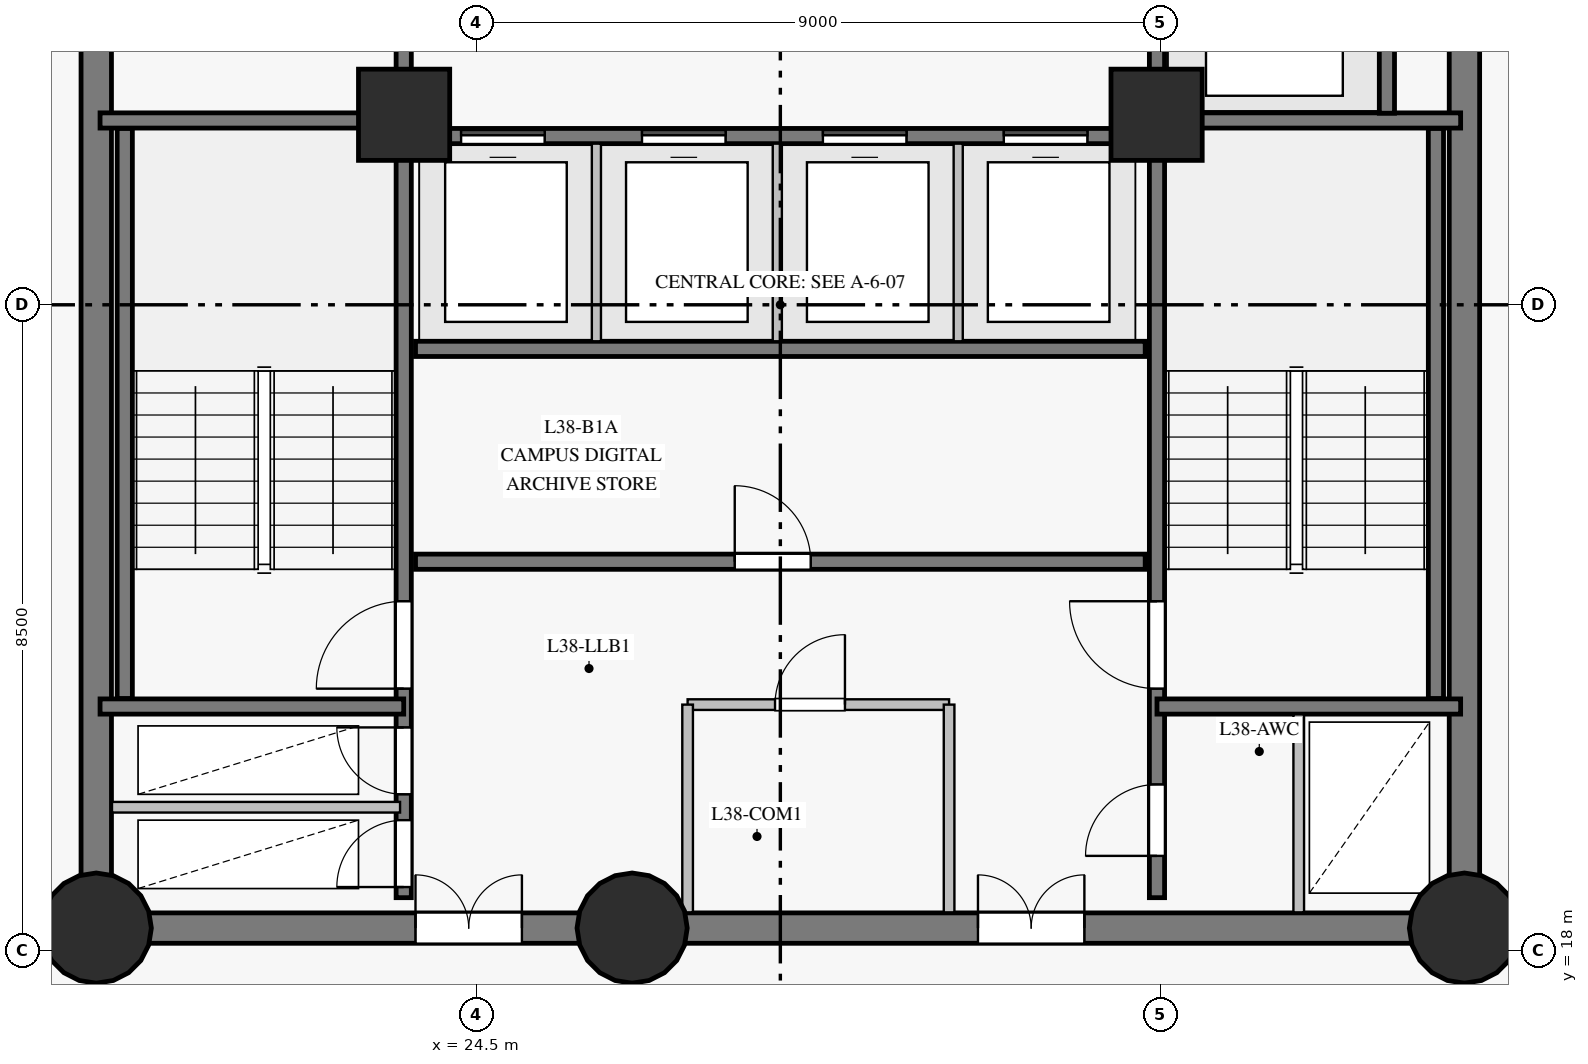
"""IFC4 building model, lengths in metres.
Left out: names, types, materials, properties, quantities, classifications, styles, units other than length and angle.
Written with IfcOpenShell. Run it as: python <this file> out.ifc"""

import sys

from ifc_helpers import new_model, si_unit, direction, frame, frame_2d, origin, origin_with_axes, origin_2d, place, context, subcontext, project, spatial, rectangle, circle, extrude, source, transform, mapped, element, fill, save


model = new_model("IFC4")
c1 = context("Model", 3, precision=1e-05, world=origin(), true_north=direction((0.0, 1.0)))
c2 = subcontext(c1, "Body", "Model", "MODEL_VIEW")
j1 = project(units=[si_unit("LENGTHUNIT", "METRE"), si_unit("PLANEANGLEUNIT", "RADIAN")], contexts=[c1])
p1 = place(None, origin())
s1 = spatial("IfcSite", under=j1, at=p1, CompositionType="ELEMENT")
p2 = place(p1, origin())
s2 = spatial("IfcBuilding", under=s1, at=p2, CompositionType="ELEMENT")
p3 = place(p2, frame((0.0, 0.0, 135.85)))
s3 = spatial("IfcBuildingStorey", under=s2, at=p3, CompositionType="ELEMENT", Elevation=135.85)
p4 = place(p3, frame((19.5, 18.3, 0.0), z_axis=(0.0, 0.0, 1.0), x_axis=(1.0, 0.0, 0.0)))
e1 = element("IfcWall", 1, at=p4, inside=s3, PredefinedType="SHEAR", context=c2, shape_type="SweptSolid", body=[
    extrude(rectangle(XDim=7.05, YDim=0.4, at=frame_2d((3.525, 0.0))), origin(), (0.0, 0.0, 1.0), 2.825),
])
p5 = place(p4, frame((4.2, 0.0, 0.0)))
e2 = element("IfcOpeningElement", 2, at=p5, cuts=e1, PredefinedType="OPENING", context=c2, shape_type="SweptSolid", body=[
    extrude(rectangle(XDim=1.4, YDim=2.2, at=frame_2d((0.7, 1.1))), frame((0.0, 0.21, 0.0), z_axis=(0.0, -1.0, 0.0), x_axis=(1.0, 0.0, 0.0)), (0.0, 0.0, 1.0), 0.42),
])
p6 = place(p3, frame((26.55, 18.3, 0.0), z_axis=(0.0, 0.0, 1.0), x_axis=(1.0, 0.0, 0.0)))
e3 = element("IfcWall", 3, at=p6, inside=s3, PredefinedType="SHEAR", context=c2, shape_type="SweptSolid", body=[
    extrude(rectangle(XDim=10.95, YDim=0.4, at=frame_2d((5.475, 0.0))), origin(), (0.0, 0.0, 1.0), 2.825),
])
p7 = place(p6, frame((4.55, 0.0, 0.0)))
e4 = element("IfcOpeningElement", 4, at=p7, cuts=e3, PredefinedType="OPENING", context=c2, shape_type="SweptSolid", body=[
    extrude(rectangle(XDim=1.4, YDim=2.2, at=frame_2d((0.7, 1.1))), frame((0.0, 0.21, 0.0), z_axis=(0.0, -1.0, 0.0), x_axis=(1.0, 0.0, 0.0)), (0.0, 0.0, 1.0), 0.42),
])
p8 = place(p3, frame((37.5, 18.3, 0.0), z_axis=(0.0, 0.0, 1.0), x_axis=(0.0, 1.0, 0.0)))
e5 = element("IfcWall", 5, at=p8, inside=s3, PredefinedType="SHEAR", context=c2, shape_type="SweptSolid", body=[
    extrude(rectangle(XDim=16.4, YDim=0.4, at=frame_2d((8.2, 0.0))), origin(), (0.0, 0.0, 1.0), 2.825),
])
p9 = place(p8, frame((14.15, 0.0, 0.0)))
e6 = element("IfcOpeningElement", 6, at=p9, cuts=e5, PredefinedType="OPENING", context=c2, shape_type="SweptSolid", body=[
    extrude(rectangle(XDim=1.2, YDim=2.15, at=frame_2d((0.6, 1.075))), frame((0.0, 0.21, 0.0), z_axis=(0.0, -1.0, 0.0), x_axis=(1.0, 0.0, 0.0)), (0.0, 0.0, 1.0), 0.42),
])
p10 = place(p3, frame((19.5, 34.7, 0.0), z_axis=(0.0, 0.0, 1.0), x_axis=(0.0, -1.0, 0.0)))
e7 = element("IfcWall", 7, at=p10, inside=s3, PredefinedType="SHEAR", context=c2, shape_type="SweptSolid", body=[
    extrude(rectangle(XDim=16.4, YDim=0.4, at=frame_2d((8.2, 0.0))), origin(), (0.0, 0.0, 1.0), 2.825),
])
p11 = place(p10, frame((3.1, 0.0, 0.0)))
e8 = element("IfcOpeningElement", 8, at=p11, cuts=e7, PredefinedType="OPENING", context=c2, shape_type="SweptSolid", body=[
    extrude(rectangle(XDim=1.1, YDim=2.15, at=frame_2d((0.55, 1.075))), frame((0.0, 0.21, 0.0), z_axis=(0.0, -1.0, 0.0), x_axis=(1.0, 0.0, 0.0)), (0.0, 0.0, 1.0), 0.42),
])
m1 = source(origin_with_axes(), c2, "Body", "SweptSolid", [
    extrude(circle(Radius=0.725, at=origin_2d()), origin(), (0.0, 0.0, 1.0), 3.05),
])
for number, where, z_axis, x_axis in (
    (9, (19.5, 18.3, 0.0), (0.0, 0.0, 1.0), (1.0, 0.0, 0.0)),
    (10, (26.55, 18.3, 0.0), (0.0, 0.0, 1.0), (1.0, 0.0, 0.0)),
    (11, (37.5, 18.3, 0.0), (0.0, 0.0, 1.0), (1.0, 0.0, 0.0)),
):
    element("IfcColumn", number, at=place(p3, frame(where, z_axis=z_axis, x_axis=x_axis)), inside=s3, PredefinedType="COLUMN", context=c2, shape_type="MappedRepresentation", body=[
        mapped(m1, transform((0.0, 0.0, 0.0), scale=1.0)),
    ])
m2 = source(origin_with_axes(), c2, "Body", "SweptSolid", [
    extrude(rectangle(XDim=1.2, YDim=1.2, at=origin_2d()), origin(), (0.0, 0.0, 1.0), 3.05),
])
for number, where, z_axis, x_axis in (
    (12, (23.55, 29.0, 0.0), (0.0, 0.0, 1.0), (1.0, 0.0, 0.0)),
    (13, (33.45, 29.0, 0.0), (0.0, 0.0, 1.0), (1.0, 0.0, 0.0)),
):
    element("IfcColumn", number, at=place(p3, frame(where, z_axis=z_axis, x_axis=x_axis)), inside=s3, PredefinedType="COLUMN", context=c2, shape_type="MappedRepresentation", body=[
        mapped(m2, transform((0.0, 0.0, 0.0), scale=1.0)),
    ])
p12 = place(p3, frame((23.545, 18.7, 0.0), z_axis=(0.0, 0.0, 1.0), x_axis=(0.0, 1.0, 0.0)))
e14 = element("IfcWall", 14, at=p12, inside=s3, PredefinedType="SHEAR", context=c2, shape_type="SweptSolid", body=[
    extrude(rectangle(XDim=15.6, YDim=0.2, at=frame_2d((7.8, 0.0))), origin(), (0.0, 0.0, 1.0), 2.825),
])
p13 = place(p12, frame((2.75, 0.0, 0.0)))
e15 = element("IfcOpeningElement", 15, at=p13, cuts=e14, PredefinedType="OPENING", context=c2, shape_type="SweptSolid", body=[
    extrude(rectangle(XDim=1.15, YDim=2.15, at=frame_2d((0.575, 1.075))), frame((0.0, 0.11, 0.0), z_axis=(0.0, -1.0, 0.0), x_axis=(1.0, 0.0, 0.0)), (0.0, 0.0, 1.0), 0.22),
])
p14 = place(p12, frame((0.14, 0.0, 0.0)))
e16 = element("IfcOpeningElement", 16, at=p14, cuts=e14, PredefinedType="OPENING", context=c2, shape_type="SweptSolid", body=[
    extrude(rectangle(XDim=0.88, YDim=2.1, at=frame_2d((0.44, 1.05))), frame((0.0, 0.11, 0.0), z_axis=(0.0, -1.0, 0.0), x_axis=(1.0, 0.0, 0.0)), (0.0, 0.0, 1.0), 0.22),
])
p15 = place(p12, frame((1.36, 0.0, 0.0)))
e17 = element("IfcOpeningElement", 17, at=p15, cuts=e14, PredefinedType="OPENING", context=c2, shape_type="SweptSolid", body=[
    extrude(rectangle(XDim=0.88, YDim=2.1, at=frame_2d((0.44, 1.05))), frame((0.0, 0.11, 0.0), z_axis=(0.0, -1.0, 0.0), x_axis=(1.0, 0.0, 0.0)), (0.0, 0.0, 1.0), 0.22),
])
p16 = place(p12, frame((12.1, 0.0, 0.0)))
e18 = element("IfcOpeningElement", 18, at=p16, cuts=e14, PredefinedType="OPENING", context=c2, shape_type="SweptSolid", body=[
    extrude(rectangle(XDim=1.12, YDim=2.15, at=frame_2d((0.56, 1.075))), frame((0.0, 0.11, 0.0), z_axis=(0.0, -1.0, 0.0), x_axis=(1.0, 0.0, 0.0)), (0.0, 0.0, 1.0), 0.22),
])
p17 = place(p12, frame((14.05, 0.0, 0.0)))
e19 = element("IfcOpeningElement", 19, at=p17, cuts=e14, PredefinedType="OPENING", context=c2, shape_type="SweptSolid", body=[
    extrude(rectangle(XDim=1.12, YDim=2.15, at=frame_2d((0.56, 1.075))), frame((0.0, 0.11, 0.0), z_axis=(0.0, -1.0, 0.0), x_axis=(1.0, 0.0, 0.0)), (0.0, 0.0, 1.0), 0.22),
])
p18 = place(p3, frame((33.455, 18.7, 0.0), z_axis=(0.0, 0.0, 1.0), x_axis=(0.0, 1.0, 0.0)))
e20 = element("IfcWall", 20, at=p18, inside=s3, PredefinedType="SHEAR", context=c2, shape_type="SweptSolid", body=[
    extrude(rectangle(XDim=15.6, YDim=0.2, at=frame_2d((7.8, 0.0))), origin(), (0.0, 0.0, 1.0), 2.825),
])
p19 = place(p18, frame((2.75, 0.0, 0.0)))
e21 = element("IfcOpeningElement", 21, at=p19, cuts=e20, PredefinedType="OPENING", context=c2, shape_type="SweptSolid", body=[
    extrude(rectangle(XDim=1.15, YDim=2.15, at=frame_2d((0.575, 1.075))), frame((0.0, 0.11, 0.0), z_axis=(0.0, -1.0, 0.0), x_axis=(1.0, 0.0, 0.0)), (0.0, 0.0, 1.0), 0.22),
])
p20 = place(p18, frame((0.55, 0.0, 0.0)))
e22 = element("IfcOpeningElement", 22, at=p20, cuts=e20, PredefinedType="OPENING", context=c2, shape_type="SweptSolid", body=[
    extrude(rectangle(XDim=0.94, YDim=2.1, at=frame_2d((0.47, 1.05))), frame((0.0, 0.11, 0.0), z_axis=(0.0, -1.0, 0.0), x_axis=(1.0, 0.0, 0.0)), (0.0, 0.0, 1.0), 0.22),
])
p21 = place(p3, frame((23.7, 23.12, 0.0), z_axis=(0.0, 0.0, 1.0), x_axis=(1.0, 0.0, 0.0)))
e23 = element("IfcWall", 23, at=p21, inside=s3, PredefinedType="SHEAR", context=c2, shape_type="SweptSolid", body=[
    extrude(rectangle(XDim=9.6, YDim=0.2, at=frame_2d((4.8, 0.0))), origin(), (0.0, 0.0, 1.0), 2.825),
])
p22 = place(p21, frame((4.2, 0.0, 0.0)))
e24 = element("IfcOpeningElement", 24, at=p22, cuts=e23, PredefinedType="OPENING", context=c2, shape_type="SweptSolid", body=[
    extrude(rectangle(XDim=1.0, YDim=2.15, at=frame_2d((0.5, 1.075))), frame((0.0, 0.11, 0.0), z_axis=(0.0, -1.0, 0.0), x_axis=(1.0, 0.0, 0.0)), (0.0, 0.0, 1.0), 0.22),
])
p23 = place(p3, frame((23.7, 25.92, 0.0), z_axis=(0.0, 0.0, 1.0), x_axis=(1.0, 0.0, 0.0)))
e25 = element("IfcWall", 25, at=p23, inside=s3, PredefinedType="SHEAR", context=c2, shape_type="SweptSolid", body=[
    extrude(rectangle(XDim=9.6, YDim=0.2, at=frame_2d((4.8, 0.0))), origin(), (0.0, 0.0, 1.0), 2.825),
])
p24 = place(p3, frame((23.7, 28.72, 0.0), z_axis=(0.0, 0.0, 1.0), x_axis=(1.0, 0.0, 0.0)))
e26 = element("IfcWall", 26, at=p24, inside=s3, PredefinedType="SHEAR", context=c2, shape_type="SweptSolid", body=[
    extrude(rectangle(XDim=9.6, YDim=0.2, at=frame_2d((4.8, 0.0))), origin(), (0.0, 0.0, 1.0), 2.825),
])
p25 = place(p24, frame((0.6, 0.0, 0.0)))
e27 = element("IfcOpeningElement", 27, at=p25, cuts=e26, PredefinedType="OPENING", context=c2, shape_type="SweptSolid", body=[
    extrude(rectangle(XDim=1.1, YDim=2.15, at=frame_2d((0.55, 1.075))), frame((0.0, 0.11, 0.0), z_axis=(0.0, -1.0, 0.0), x_axis=(1.0, 0.0, 0.0)), (0.0, 0.0, 1.0), 0.22),
])
p26 = place(p24, frame((2.98, 0.0, 0.0)))
e28 = element("IfcOpeningElement", 28, at=p26, cuts=e26, PredefinedType="OPENING", context=c2, shape_type="SweptSolid", body=[
    extrude(rectangle(XDim=1.1, YDim=2.15, at=frame_2d((0.55, 1.075))), frame((0.0, 0.11, 0.0), z_axis=(0.0, -1.0, 0.0), x_axis=(1.0, 0.0, 0.0)), (0.0, 0.0, 1.0), 0.22),
])
p27 = place(p24, frame((5.36, 0.0, 0.0)))
e29 = element("IfcOpeningElement", 29, at=p27, cuts=e26, PredefinedType="OPENING", context=c2, shape_type="SweptSolid", body=[
    extrude(rectangle(XDim=1.1, YDim=2.15, at=frame_2d((0.55, 1.075))), frame((0.0, 0.11, 0.0), z_axis=(0.0, -1.0, 0.0), x_axis=(1.0, 0.0, 0.0)), (0.0, 0.0, 1.0), 0.22),
])
p28 = place(p24, frame((7.74, 0.0, 0.0)))
e30 = element("IfcOpeningElement", 30, at=p28, cuts=e26, PredefinedType="OPENING", context=c2, shape_type="SweptSolid", body=[
    extrude(rectangle(XDim=1.1, YDim=2.15, at=frame_2d((0.55, 1.075))), frame((0.0, 0.11, 0.0), z_axis=(0.0, -1.0, 0.0), x_axis=(1.0, 0.0, 0.0)), (0.0, 0.0, 1.0), 0.22),
])
for number, where, z_axis, x_axis in (
    (31, (19.875, 21.32, 0.0), (0.0, 0.0, 1.0), (0.0, 1.0, 0.0)),
    (32, (37.125, 21.32, 0.0), (0.0, 0.0, 1.0), (0.0, 1.0, 0.0)),
):
    element("IfcWall", number, at=place(p3, frame(where, z_axis=z_axis, x_axis=x_axis)), inside=s3, PredefinedType="SHEAR", context=c2, shape_type="SweptSolid", body=[
        extrude(rectangle(XDim=7.5, YDim=0.2, at=frame_2d((3.75, 0.0))), origin(), (0.0, 0.0, 1.0), 2.825),
    ])
for number, where, z_axis, x_axis in (
    (33, (33.455, 21.215, 0.0), (0.0, 0.0, 1.0), (1.0, 0.0, 0.0)),
    (34, (33.455, 28.925, 0.0), (0.0, 0.0, 1.0), (1.0, 0.0, 0.0)),
    (35, (19.55, 21.215, 0.0), (0.0, 0.0, 1.0), (1.0, 0.0, 0.0)),
    (36, (19.55, 28.925, 0.0), (0.0, 0.0, 1.0), (1.0, 0.0, 0.0)),
):
    element("IfcWall", number, at=place(p3, frame(where, z_axis=z_axis, x_axis=x_axis)), inside=s3, PredefinedType="SHEAR", context=c2, shape_type="SweptSolid", body=[
        extrude(rectangle(XDim=3.995, YDim=0.2, at=frame_2d((1.998, 0.0))), origin(), (0.0, 0.0, 1.0), 2.825),
    ])
p29 = place(p3, frame((36.48, 29.02, 0.0), z_axis=(0.0, 0.0, 1.0), x_axis=(0.0, 1.0, 0.0)))
e37 = element("IfcWall", 37, at=p29, inside=s3, PredefinedType="SHEAR", context=c2, shape_type="SweptSolid", body=[
    extrude(rectangle(XDim=2.86, YDim=0.2, at=frame_2d((1.43, 0.0))), origin(), (0.0, 0.0, 1.0), 2.825),
])
p30 = place(p3, frame((19.707, 19.89, 0.0), z_axis=(0.0, 0.0, 1.0), x_axis=(1.0, 0.0, 0.0)))
e38 = element("IfcWall", 38, at=p30, inside=s3, PredefinedType="PARTITIONING", context=c2, shape_type="SweptSolid", body=[
    extrude(rectangle(XDim=3.79, YDim=0.14, at=frame_2d((1.895, 0.0))), origin(), (0.0, 0.0, 1.0), 2.825),
])
p31 = place(p3, frame((27.28, 21.24, 0.0), z_axis=(0.0, 0.0, 1.0), x_axis=(1.0, 0.0, 0.0)))
e39 = element("IfcWall", 39, at=p31, inside=s3, PredefinedType="PARTITIONING", context=c2, shape_type="SweptSolid", body=[
    extrude(rectangle(XDim=3.44, YDim=0.14, at=frame_2d((1.72, 0.0))), origin(), (0.0, 0.0, 1.0), 2.825),
])
p32 = place(p31, frame((1.15, 0.0, 0.0)))
e40 = element("IfcOpeningElement", 40, at=p32, cuts=e39, PredefinedType="OPENING", context=c2, shape_type="SweptSolid", body=[
    extrude(rectangle(XDim=0.92, YDim=2.1, at=frame_2d((0.46, 1.05))), frame((0.0, 0.08, 0.0), z_axis=(0.0, -1.0, 0.0), x_axis=(1.0, 0.0, 0.0)), (0.0, 0.0, 1.0), 0.16),
])
for number, where, z_axis, x_axis in (
    (41, (27.28, 18.507, 0.0), (0.0, 0.0, 1.0), (0.0, 1.0, 0.0)),
    (42, (30.72, 18.507, 0.0), (0.0, 0.0, 1.0), (0.0, 1.0, 0.0)),
):
    element("IfcWall", number, at=place(p3, frame(where, z_axis=z_axis, x_axis=x_axis)), inside=s3, PredefinedType="PARTITIONING", context=c2, shape_type="SweptSolid", body=[
        extrude(rectangle(XDim=2.733, YDim=0.14, at=frame_2d((1.366, 0.0))), origin(), (0.0, 0.0, 1.0), 2.825),
    ])
for number, where, z_axis, x_axis in (
    (43, (26.08, 26.02, 0.0), (0.0, 0.0, 1.0), (0.0, 1.0, 0.0)),
    (44, (28.46, 26.02, 0.0), (0.0, 0.0, 1.0), (0.0, 1.0, 0.0)),
    (45, (30.84, 26.02, 0.0), (0.0, 0.0, 1.0), (0.0, 1.0, 0.0)),
):
    element("IfcWall", number, at=place(p3, frame(where, z_axis=z_axis, x_axis=x_axis)), inside=s3, PredefinedType="PARTITIONING", context=c2, shape_type="SweptSolid", body=[
        extrude(rectangle(XDim=2.6, YDim=0.12, at=frame_2d((1.3, 0.0))), origin(), (0.0, 0.0, 1.0), 2.825),
    ])
p33 = place(p3, frame((35.32, 18.507, 0.0), z_axis=(0.0, 0.0, 1.0), x_axis=(0.0, 1.0, 0.0)))
e46 = element("IfcWall", 46, at=p33, inside=s3, PredefinedType="PARTITIONING", context=c2, shape_type="SweptSolid", body=[
    extrude(rectangle(XDim=2.604, YDim=0.14, at=frame_2d((1.302, 0.0))), origin(), (0.0, 0.0, 1.0), 2.825),
])
m3 = source(origin_with_axes(), c2, "Body", "SweptSolid", [
    extrude(rectangle(XDim=1.15, YDim=2.15, at=frame_2d((0.575, 1.075))), frame((0.0, 0.025, 0.0), z_axis=(0.0, -1.0, 0.0), x_axis=(1.0, 0.0, 0.0)), (0.0, 0.0, 1.0), 0.05),
])
p34 = place(p13, origin())
e47 = element("IfcDoor", 47, at=p34, inside=s3, OperationType="SINGLE_SWING_LEFT", PredefinedType="DOOR", context=c2, shape_type="MappedRepresentation", body=[
    mapped(m3, transform((0.0, 0.0, 0.0), scale=1.0)),
])
fill(e15, e47)
p35 = place(p19, origin())
e48 = element("IfcDoor", 48, at=p35, inside=s3, OperationType="SINGLE_SWING_RIGHT", PredefinedType="DOOR", context=c2, shape_type="MappedRepresentation", body=[
    mapped(m3, transform((0.0, 0.0, 0.0), scale=1.0)),
])
fill(e21, e48)
m4 = source(origin_with_axes(), c2, "Body", "SweptSolid", [
    extrude(rectangle(XDim=0.88, YDim=2.1, at=frame_2d((0.44, 1.05))), frame((0.0, 0.025, 0.0), z_axis=(0.0, -1.0, 0.0), x_axis=(1.0, 0.0, 0.0)), (0.0, 0.0, 1.0), 0.05),
])
p36 = place(p14, origin())
e49 = element("IfcDoor", 49, at=p36, inside=s3, OperationType="SINGLE_SWING_LEFT", PredefinedType="DOOR", context=c2, shape_type="MappedRepresentation", body=[
    mapped(m4, transform((0.0, 0.0, 0.0), scale=1.0)),
])
fill(e16, e49)
p37 = place(p15, origin())
e50 = element("IfcDoor", 50, at=p37, inside=s3, OperationType="SINGLE_SWING_RIGHT", PredefinedType="DOOR", context=c2, shape_type="MappedRepresentation", body=[
    mapped(m4, transform((0.0, 0.0, 0.0), scale=1.0)),
])
fill(e17, e50)
m5 = source(origin_with_axes(), c2, "Body", "SweptSolid", [
    extrude(rectangle(XDim=1.4, YDim=2.2, at=frame_2d((0.7, 1.1))), frame((0.0, 0.025, 0.0), z_axis=(0.0, -1.0, 0.0), x_axis=(1.0, 0.0, 0.0)), (0.0, 0.0, 1.0), 0.05),
])
p38 = place(p5, origin())
e51 = element("IfcDoor", 51, at=p38, inside=s3, OperationType="DOUBLE_DOOR_SINGLE_SWING", PredefinedType="DOOR", context=c2, shape_type="MappedRepresentation", body=[
    mapped(m5, transform((0.0, 0.0, 0.0), scale=1.0)),
])
fill(e2, e51)
p39 = place(p7, origin())
e52 = element("IfcDoor", 52, at=p39, inside=s3, OperationType="DOUBLE_DOOR_SINGLE_SWING", PredefinedType="DOOR", context=c2, shape_type="MappedRepresentation", body=[
    mapped(m5, transform((0.0, 0.0, 0.0), scale=1.0)),
])
fill(e4, e52)
m6 = source(origin_with_axes(), c2, "Body", "SweptSolid", [
    extrude(rectangle(XDim=0.94, YDim=2.1, at=frame_2d((0.47, 1.05))), frame((0.0, 0.025, 0.0), z_axis=(0.0, -1.0, 0.0), x_axis=(1.0, 0.0, 0.0)), (0.0, 0.0, 1.0), 0.05),
])
p40 = place(p20, origin())
e53 = element("IfcDoor", 53, at=p40, inside=s3, OperationType="SINGLE_SWING_LEFT", PredefinedType="DOOR", context=c2, shape_type="MappedRepresentation", body=[
    mapped(m6, transform((0.0, 0.0, 0.0), scale=1.0)),
])
fill(e22, e53)
m7 = source(origin_with_axes(), c2, "Body", "SweptSolid", [
    extrude(rectangle(XDim=0.92, YDim=2.1, at=frame_2d((0.46, 1.05))), frame((0.0, 0.025, 0.0), z_axis=(0.0, -1.0, 0.0), x_axis=(1.0, 0.0, 0.0)), (0.0, 0.0, 1.0), 0.05),
])
p41 = place(p32, origin())
e54 = element("IfcDoor", 54, at=p41, inside=s3, OperationType="SINGLE_SWING_RIGHT", PredefinedType="DOOR", context=c2, shape_type="MappedRepresentation", body=[
    mapped(m7, transform((0.0, 0.0, 0.0), scale=1.0)),
])
fill(e40, e54)
m8 = source(origin_with_axes(), c2, "Body", "SweptSolid", [
    extrude(rectangle(XDim=1.0, YDim=2.15, at=frame_2d((0.5, 1.075))), frame((0.0, 0.025, 0.0), z_axis=(0.0, -1.0, 0.0), x_axis=(1.0, 0.0, 0.0)), (0.0, 0.0, 1.0), 0.05),
])
p42 = place(p22, origin())
e55 = element("IfcDoor", 55, at=p42, inside=s3, OperationType="SINGLE_SWING_LEFT", PredefinedType="DOOR", context=c2, shape_type="MappedRepresentation", body=[
    mapped(m8, transform((0.0, 0.0, 0.0), scale=1.0)),
])
fill(e24, e55)
m9 = source(origin_with_axes(), c2, "Body", "SweptSolid", [
    extrude(rectangle(XDim=1.1, YDim=2.15, at=frame_2d((0.55, 1.075))), frame((0.0, 0.025, 0.0), z_axis=(0.0, -1.0, 0.0), x_axis=(1.0, 0.0, 0.0)), (0.0, 0.0, 1.0), 0.05),
])
p43 = place(p25, origin())
e56 = element("IfcDoor", 56, at=p43, inside=s3, OperationType="SLIDING_TO_LEFT", PredefinedType="DOOR", context=c2, shape_type="MappedRepresentation", body=[
    mapped(m9, transform((0.0, 0.0, 0.0), scale=1.0)),
])
fill(e27, e56)
p44 = place(p26, origin())
e57 = element("IfcDoor", 57, at=p44, inside=s3, OperationType="SLIDING_TO_RIGHT", PredefinedType="DOOR", context=c2, shape_type="MappedRepresentation", body=[
    mapped(m9, transform((0.0, 0.0, 0.0), scale=1.0)),
])
fill(e28, e57)
p45 = place(p27, origin())
e58 = element("IfcDoor", 58, at=p45, inside=s3, OperationType="SLIDING_TO_LEFT", PredefinedType="DOOR", context=c2, shape_type="MappedRepresentation", body=[
    mapped(m9, transform((0.0, 0.0, 0.0), scale=1.0)),
])
fill(e29, e58)
p46 = place(p28, origin())
e59 = element("IfcDoor", 59, at=p46, inside=s3, OperationType="SLIDING_TO_RIGHT", PredefinedType="DOOR", context=c2, shape_type="MappedRepresentation", body=[
    mapped(m9, transform((0.0, 0.0, 0.0), scale=1.0)),
])
fill(e30, e59)
save(model, sys.argv[1])
